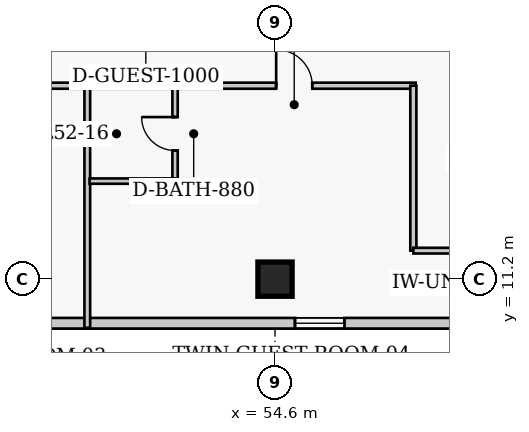
"""IFC4 building model, lengths in metres.
Left out: names, types, materials, properties, quantities, classifications, styles, units other than length and angle.
Written with IfcOpenShell. Run it as: python <this file> out.ifc"""

import sys

from ifc_helpers import new_model, si_unit, direction, frame, frame_2d, origin, origin_2d, place, context, subcontext, project, spatial, rectangle, extrude, element, fill, save


model = new_model("IFC4")
c1 = context("Model", 3, precision=1e-05, world=origin(), true_north=direction((0.0, 1.0)))
c2 = subcontext(c1, "Body", "Model", "MODEL_VIEW")
j1 = project(units=[si_unit("LENGTHUNIT", "METRE"), si_unit("PLANEANGLEUNIT", "RADIAN")], contexts=[c1])
p1 = place(None, origin())
s1 = spatial("IfcSite", under=j1, at=p1, CompositionType="ELEMENT")
p2 = place(p1, origin())
s2 = spatial("IfcBuilding", under=s1, at=p2, CompositionType="ELEMENT")
p3 = place(p2, frame((0.0, 0.0, 208.5)))
s3 = spatial("IfcBuildingStorey", under=s2, at=p3, CompositionType="ELEMENT", Elevation=208.5)
p4 = place(p3, frame((54.6, 11.2, 0.0), z_axis=(0.0, 0.0, 1.0), x_axis=(1.0, 0.0, 0.0)))
e1 = element("IfcColumn", 1, at=p4, inside=s3, PredefinedType="COLUMN", context=c2, shape_type="SweptSolid", body=[
    extrude(rectangle(XDim=0.9, YDim=0.9, at=origin_2d()), origin(), (0.0, 0.0, 1.0), 3.9),
])
p5 = place(p3, frame((41.71, 10.04, 0.0), z_axis=(0.0, 0.0, 1.0), x_axis=(1.0, 0.0, 0.0)))
e2 = element("IfcWall", 2, at=p5, inside=s3, PredefinedType="SOLIDWALL", context=c2, shape_type="SweptSolid", body=[
    extrude(rectangle(XDim=25.83, YDim=0.28, at=frame_2d((12.915, 0.0))), origin(), (0.0, 0.0, 1.0), 3.65),
])
p6 = place(p5, frame((3.005, 0.0, 0.85)))
e3 = element("IfcOpeningElement", 3, at=p6, cuts=e2, PredefinedType="OPENING", context=c2, shape_type="SweptSolid", body=[
    extrude(rectangle(XDim=1.3, YDim=1.7, at=frame_2d((0.65, 0.85))), frame((0.0, 0.15, 0.0), z_axis=(0.0, -1.0, 0.0), x_axis=(1.0, 0.0, 0.0)), (0.0, 0.0, 1.0), 0.3),
])
p7 = place(p5, frame((13.415, 0.0, 0.85)))
e4 = element("IfcOpeningElement", 4, at=p7, cuts=e2, PredefinedType="OPENING", context=c2, shape_type="SweptSolid", body=[
    extrude(rectangle(XDim=1.3, YDim=1.7, at=frame_2d((0.65, 0.85))), frame((0.0, 0.15, 0.0), z_axis=(0.0, -1.0, 0.0), x_axis=(1.0, 0.0, 0.0)), (0.0, 0.0, 1.0), 0.3),
])
p8 = place(p5, frame((21.525, 0.0, 0.85)))
e5 = element("IfcOpeningElement", 5, at=p8, cuts=e2, PredefinedType="OPENING", context=c2, shape_type="SweptSolid", body=[
    extrude(rectangle(XDim=1.3, YDim=1.7, at=frame_2d((0.65, 0.85))), frame((0.0, 0.15, 0.0), z_axis=(0.0, -1.0, 0.0), x_axis=(1.0, 0.0, 0.0)), (0.0, 0.0, 1.0), 0.3),
])
p9 = place(p3, frame((35.8, 16.29, 0.0), z_axis=(0.0, 0.0, 1.0), x_axis=(1.0, 0.0, 0.0)))
e6 = element("IfcWall", 6, at=p9, inside=s3, PredefinedType="PARTITIONING", context=c2, shape_type="SweptSolid", body=[
    extrude(rectangle(XDim=22.5, YDim=0.16, at=frame_2d((11.25, 0.0))), origin(), (0.0, 0.0, 1.0), 3.65),
])
p10 = place(p9, frame((2.69, 0.0, 0.0)))
e7 = element("IfcOpeningElement", 7, at=p10, cuts=e6, PredefinedType="OPENING", context=c2, shape_type="SweptSolid", body=[
    extrude(rectangle(XDim=1.0, YDim=2.15, at=frame_2d((0.5, 1.075))), frame((0.0, 0.09, 0.0), z_axis=(0.0, -1.0, 0.0), x_axis=(1.0, 0.0, 0.0)), (0.0, 0.0, 1.0), 0.18),
])
p11 = place(p9, frame((10.8, 0.0, 0.0)))
e8 = element("IfcOpeningElement", 8, at=p11, cuts=e6, PredefinedType="OPENING", context=c2, shape_type="SweptSolid", body=[
    extrude(rectangle(XDim=0.95, YDim=2.1, at=frame_2d((0.475, 1.05))), frame((0.0, 0.09, 0.0), z_axis=(0.0, -1.0, 0.0), x_axis=(1.0, 0.0, 0.0)), (0.0, 0.0, 1.0), 0.18),
])
p12 = place(p9, frame((18.83, 0.0, 0.0)))
e9 = element("IfcOpeningElement", 9, at=p12, cuts=e6, PredefinedType="OPENING", context=c2, shape_type="SweptSolid", body=[
    extrude(rectangle(XDim=0.95, YDim=2.1, at=frame_2d((0.475, 1.05))), frame((0.0, 0.09, 0.0), z_axis=(0.0, -1.0, 0.0), x_axis=(1.0, 0.0, 0.0)), (0.0, 0.0, 1.0), 0.18),
])
p13 = place(p3, frame((58.24, 11.95, 0.0), z_axis=(0.0, 0.0, 1.0), x_axis=(0.0, 1.0, 0.0)))
e10 = element("IfcWall", 10, at=p13, inside=s3, PredefinedType="PARTITIONING", context=c2, shape_type="SweptSolid", body=[
    extrude(rectangle(XDim=4.34, YDim=0.16, at=frame_2d((2.17, 0.0))), origin(), (0.0, 0.0, 1.0), 3.65),
])
p14 = place(p3, frame((58.24, 11.95, 0.0), z_axis=(0.0, 0.0, 1.0), x_axis=(1.0, 0.0, 0.0)))
e11 = element("IfcWall", 11, at=p14, inside=s3, PredefinedType="PARTITIONING", context=c2, shape_type="SweptSolid", body=[
    extrude(rectangle(XDim=2.22, YDim=0.15, at=frame_2d((1.11, 0.0))), origin(), (0.0, 0.0, 1.0), 3.65),
])
p15 = place(p3, frame((49.66, 9.92, 0.0), z_axis=(0.0, 0.0, 1.0), x_axis=(0.0, 1.0, 0.0)))
e12 = element("IfcWall", 12, at=p15, inside=s3, PredefinedType="PARTITIONING", context=c2, shape_type="SweptSolid", body=[
    extrude(rectangle(XDim=6.37, YDim=0.15, at=frame_2d((3.185, 0.0))), origin(), (0.0, 0.0, 1.0), 3.65),
])
p16 = place(p3, frame((51.97, 13.78, 0.0), z_axis=(0.0, 0.0, 1.0), x_axis=(0.0, 1.0, 0.0)))
e13 = element("IfcWall", 13, at=p16, inside=s3, PredefinedType="PLUMBINGWALL", context=c2, shape_type="SweptSolid", body=[
    extrude(rectangle(XDim=2.49, YDim=0.14, at=frame_2d((1.245, 0.0))), origin(), (0.0, 0.0, 1.0), 3.65),
])
p17 = place(p16, frame((0.805, 0.0, 0.0)))
e14 = element("IfcOpeningElement", 14, at=p17, cuts=e13, PredefinedType="OPENING", context=c2, shape_type="SweptSolid", body=[
    extrude(rectangle(XDim=0.88, YDim=2.05, at=frame_2d((0.44, 1.025))), frame((0.0, 0.08, 0.0), z_axis=(0.0, -1.0, 0.0), x_axis=(1.0, 0.0, 0.0)), (0.0, 0.0, 1.0), 0.16),
])
p18 = place(p3, frame((49.72, 13.78, 0.0), z_axis=(0.0, 0.0, 1.0), x_axis=(1.0, 0.0, 0.0)))
e15 = element("IfcWall", 15, at=p18, inside=s3, PredefinedType="PLUMBINGWALL", context=c2, shape_type="SweptSolid", body=[
    extrude(rectangle(XDim=2.25, YDim=0.14, at=frame_2d((1.125, 0.0))), origin(), (0.0, 0.0, 1.0), 3.65),
])
p19 = place(p7, origin())
e16 = element("IfcWindow", 16, at=p19, inside=s3, PartitioningType="SINGLE_PANEL", PredefinedType="WINDOW", context=c2, shape_type="SweptSolid", body=[
    extrude(rectangle(XDim=1.3, YDim=1.7, at=frame_2d((0.65, 0.85))), frame((0.0, 0.03, 0.0), z_axis=(0.0, -1.0, 0.0), x_axis=(1.0, 0.0, 0.0)), (0.0, 0.0, 1.0), 0.06),
])
fill(e4, e16)
p20 = place(p17, origin())
e17 = element("IfcDoor", 17, at=p20, inside=s3, OperationType="SINGLE_SWING_RIGHT", PredefinedType="DOOR", context=c2, shape_type="SweptSolid", body=[
    extrude(rectangle(XDim=0.88, YDim=2.05, at=frame_2d((0.44, 1.025))), frame((0.0, 0.025, 0.0), z_axis=(0.0, -1.0, 0.0), x_axis=(1.0, 0.0, 0.0)), (0.0, 0.0, 1.0), 0.05),
])
fill(e14, e17)
p21 = place(p12, origin())
e18 = element("IfcDoor", 18, at=p21, inside=s3, OperationType="SINGLE_SWING_LEFT", PredefinedType="DOOR", context=c2, shape_type="SweptSolid", body=[
    extrude(rectangle(XDim=0.95, YDim=2.1, at=frame_2d((0.475, 1.05))), frame((0.0, 0.025, 0.0), z_axis=(0.0, -1.0, 0.0), x_axis=(1.0, 0.0, 0.0)), (0.0, 0.0, 1.0), 0.05),
])
fill(e9, e18)
save(model, sys.argv[1])
